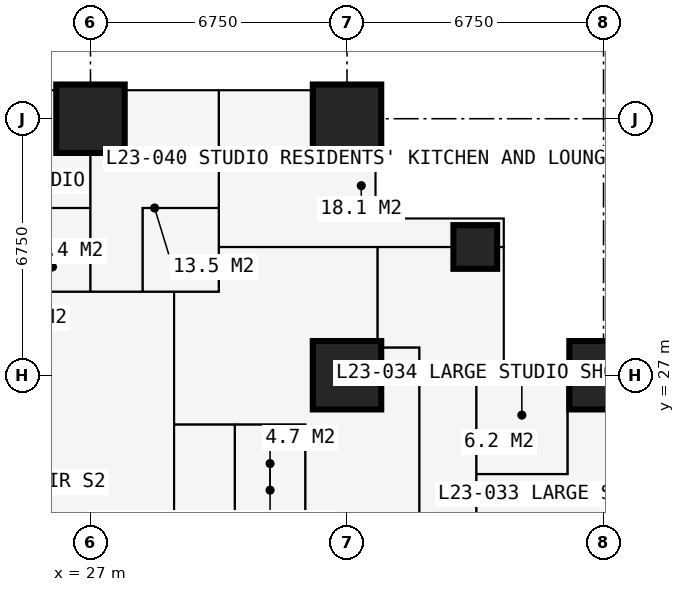
"""IFC4 building model, lengths in metres.
Left out: names, types, materials, properties, quantities, classifications, styles, units other than length and angle.
Written with IfcOpenShell. Run it as: python <this file> out.ifc"""

import sys

from ifc_helpers import new_model, si_unit, direction, frame, frame_2d, origin, origin_2d, place, context, subcontext, project, spatial, rectangle, extrude, element, fill, save


model = new_model("IFC4")
c1 = context("Model", 3, precision=1e-05, world=origin(), true_north=direction((0.0, 1.0)))
c2 = subcontext(c1, "Body", "Model", "MODEL_VIEW")
j1 = project(units=[si_unit("LENGTHUNIT", "METRE"), si_unit("PLANEANGLEUNIT", "RADIAN")], contexts=[c1])
p1 = place(None, origin())
s1 = spatial("IfcSite", under=j1, at=p1, CompositionType="ELEMENT")
p2 = place(p1, origin())
s2 = spatial("IfcBuilding", under=s1, at=p2, CompositionType="ELEMENT")
p3 = place(p2, frame((0.0, 0.0, 87.3)))
s3 = spatial("IfcBuildingStorey", under=s2, at=p3, CompositionType="ELEMENT", Elevation=87.3)
for number, where, z_axis, x_axis in (
    (1, (27.0, 33.75, 0.0), (0.0, 0.0, 1.0), (1.0, 0.0, 0.0)),
    (2, (33.75, 27.0, 0.0), (0.0, 0.0, 1.0), (1.0, 0.0, 0.0)),
    (3, (33.75, 33.75, 0.0), (0.0, 0.0, 1.0), (1.0, 0.0, 0.0)),
):
    element("IfcColumn", number, at=place(p3, frame(where, z_axis=z_axis, x_axis=x_axis)), inside=s3, PredefinedType="COLUMN", context=c2, shape_type="SweptSolid", body=[
        extrude(rectangle(XDim=1.8, YDim=1.8, at=origin_2d()), origin(), (0.0, 0.0, 1.0), 3.6),
    ])
p4 = place(p3, frame((37.125, 30.375, 0.0), z_axis=(0.0, 0.0, 1.0), x_axis=(1.0, 0.0, 0.0)))
e4 = element("IfcColumn", 4, at=p4, inside=s3, PredefinedType="COLUMN", context=c2, shape_type="SweptSolid", body=[
    extrude(rectangle(XDim=1.15, YDim=1.15, at=origin_2d()), origin(), (0.0, 0.0, 1.0), 3.6),
])
p5 = place(p3, frame((40.5, 27.0, 0.0), z_axis=(0.0, 0.0, 1.0), x_axis=(1.0, 0.0, 0.0)))
e5 = element("IfcColumn", 5, at=p5, inside=s3, PredefinedType="COLUMN", context=c2, shape_type="SweptSolid", body=[
    extrude(rectangle(XDim=1.8, YDim=1.8, at=origin_2d()), origin(), (0.0, 0.0, 1.0), 3.6),
])
p6 = place(p3, frame((27.0, 14.1, 0.0), z_axis=(0.0, 0.0, 1.0), x_axis=(0.0, 1.0, 0.0)))
e6 = element("IfcWall", 6, at=p6, inside=s3, PredefinedType="SHEAR", context=c2, shape_type="SweptSolid", body=[
    extrude(rectangle(XDim=12.3, YDim=1.2, at=frame_2d((6.15, 0.0))), origin(), (0.0, 0.0, 1.0), 3.6),
])
p7 = place(p6, frame((3.65, 0.0, 0.0)))
e7 = element("IfcOpeningElement", 7, at=p7, cuts=e6, PredefinedType="OPENING", context=c2, shape_type="SweptSolid", body=[
    extrude(rectangle(XDim=1.2, YDim=2.2, at=frame_2d((0.6, 1.1))), frame((0.0, 0.61, 0.0), z_axis=(0.0, -1.0, 0.0), x_axis=(1.0, 0.0, 0.0)), (0.0, 0.0, 1.0), 1.22),
])
p8 = place(p3, frame((27.6, 27.0, 0.0), z_axis=(0.0, 0.0, 1.0), x_axis=(-1.0, 0.0, 0.0)))
e8 = element("IfcWall", 8, at=p8, inside=s3, PredefinedType="SHEAR", context=c2, shape_type="SweptSolid", body=[
    extrude(rectangle(XDim=14.7, YDim=1.2, at=frame_2d((7.35, 0.0))), origin(), (0.0, 0.0, 1.0), 3.6),
])
p9 = place(p8, frame((5.225, 0.0, 0.0)))
e9 = element("IfcOpeningElement", 9, at=p9, cuts=e8, PredefinedType="OPENING", context=c2, shape_type="SweptSolid", body=[
    extrude(rectangle(XDim=0.9, YDim=2.2, at=frame_2d((0.45, 1.1))), frame((0.0, 0.61, 0.0), z_axis=(0.0, -1.0, 0.0), x_axis=(1.0, 0.0, 0.0)), (0.0, 0.0, 1.0), 1.22),
])
p10 = place(p8, frame((8.2, 0.0, 0.0)))
e10 = element("IfcOpeningElement", 10, at=p10, cuts=e8, PredefinedType="OPENING", context=c2, shape_type="SweptSolid", body=[
    extrude(rectangle(XDim=1.0, YDim=2.2, at=frame_2d((0.5, 1.1))), frame((0.0, 0.61, 0.0), z_axis=(0.0, -1.0, 0.0), x_axis=(1.0, 0.0, 0.0)), (0.0, 0.0, 1.0), 1.22),
])
p11 = place(p3, frame((41.25, 27.75, 0.0), z_axis=(0.0, 0.0, 1.0), x_axis=(-1.0, 0.0, 0.0)))
e11 = element("IfcWall", 11, at=p11, inside=s3, PredefinedType="SOLIDWALL", context=c2, shape_type="SweptSolid", body=[
    extrude(rectangle(XDim=3.375, YDim=0.3, at=frame_2d((1.688, 0.0))), origin(), (0.0, 0.0, 1.0), 3.375),
])
p12 = place(p11, frame((1.833, 0.0, 0.9)))
e12 = element("IfcOpeningElement", 12, at=p12, cuts=e11, PredefinedType="OPENING", context=c2, shape_type="SweptSolid", body=[
    extrude(rectangle(XDim=1.2, YDim=1.8, at=frame_2d((0.6, 0.9))), frame((0.0, 0.16, 0.0), z_axis=(0.0, -1.0, 0.0), x_axis=(1.0, 0.0, 0.0)), (0.0, 0.0, 1.0), 0.32),
])
p13 = place(p3, frame((37.875, 27.75, 0.0), z_axis=(0.0, 0.0, 1.0), x_axis=(0.0, 1.0, 0.0)))
e13 = element("IfcWall", 13, at=p13, inside=s3, PredefinedType="SOLIDWALL", context=c2, shape_type="SweptSolid", body=[
    extrude(rectangle(XDim=3.375, YDim=0.3, at=frame_2d((1.688, 0.0))), origin(), (0.0, 0.0, 1.0), 3.375),
])
p14 = place(p13, frame((0.788, 0.0, 0.6)))
e14 = element("IfcOpeningElement", 14, at=p14, cuts=e13, PredefinedType="OPENING", context=c2, shape_type="SweptSolid", body=[
    extrude(rectangle(XDim=1.8, YDim=2.1, at=frame_2d((0.9, 1.05))), frame((0.0, 0.16, 0.0), z_axis=(0.0, -1.0, 0.0), x_axis=(1.0, 0.0, 0.0)), (0.0, 0.0, 1.0), 0.32),
])
p15 = place(p3, frame((37.875, 31.125, 0.0), z_axis=(0.0, 0.0, 1.0), x_axis=(-1.0, 0.0, 0.0)))
e15 = element("IfcWall", 15, at=p15, inside=s3, PredefinedType="SOLIDWALL", context=c2, shape_type="SweptSolid", body=[
    extrude(rectangle(XDim=3.375, YDim=0.3, at=frame_2d((1.688, 0.0))), origin(), (0.0, 0.0, 1.0), 3.375),
])
p16 = place(p15, frame((0.788, 0.0, 0.6)))
e16 = element("IfcOpeningElement", 16, at=p16, cuts=e15, PredefinedType="OPENING", context=c2, shape_type="SweptSolid", body=[
    extrude(rectangle(XDim=1.8, YDim=2.1, at=frame_2d((0.9, 1.05))), frame((0.0, 0.16, 0.0), z_axis=(0.0, -1.0, 0.0), x_axis=(1.0, 0.0, 0.0)), (0.0, 0.0, 1.0), 0.32),
])
p17 = place(p3, frame((34.5, 31.125, 0.0), z_axis=(0.0, 0.0, 1.0), x_axis=(0.0, 1.0, 0.0)))
e17 = element("IfcWall", 17, at=p17, inside=s3, PredefinedType="SOLIDWALL", context=c2, shape_type="SweptSolid", body=[
    extrude(rectangle(XDim=3.375, YDim=0.3, at=frame_2d((1.688, 0.0))), origin(), (0.0, 0.0, 1.0), 3.375),
])
p18 = place(p17, frame((0.272, 0.0, 0.9)))
e18 = element("IfcOpeningElement", 18, at=p18, cuts=e17, PredefinedType="OPENING", context=c2, shape_type="SweptSolid", body=[
    extrude(rectangle(XDim=0.9, YDim=1.8, at=frame_2d((0.45, 0.9))), frame((0.0, 0.16, 0.0), z_axis=(0.0, -1.0, 0.0), x_axis=(1.0, 0.0, 0.0)), (0.0, 0.0, 1.0), 0.32),
])
p19 = place(p3, frame((11.3, 29.2, 0.0), z_axis=(0.0, 0.0, 1.0), x_axis=(1.0, 0.0, 0.0)))
e19 = element("IfcWall", 19, at=p19, inside=s3, PredefinedType="PARTITIONING", context=c2, shape_type="SweptSolid", body=[
    extrude(rectangle(XDim=19.075, YDim=0.15, at=frame_2d((9.538, 0.0))), origin(), (0.0, 0.0, 1.0), 3.375),
])
p20 = place(p19, frame((5.825, 0.0, 0.0)))
e20 = element("IfcOpeningElement", 20, at=p20, cuts=e19, PredefinedType="OPENING", context=c2, shape_type="SweptSolid", body=[
    extrude(rectangle(XDim=0.95, YDim=2.2, at=frame_2d((0.475, 1.1))), frame((0.0, 0.085, 0.0), z_axis=(0.0, -1.0, 0.0), x_axis=(1.0, 0.0, 0.0)), (0.0, 0.0, 1.0), 0.17),
])
p21 = place(p19, frame((9.2, 0.0, 0.0)))
e21 = element("IfcOpeningElement", 21, at=p21, cuts=e19, PredefinedType="OPENING", context=c2, shape_type="SweptSolid", body=[
    extrude(rectangle(XDim=0.95, YDim=2.2, at=frame_2d((0.475, 1.1))), frame((0.0, 0.085, 0.0), z_axis=(0.0, -1.0, 0.0), x_axis=(1.0, 0.0, 0.0)), (0.0, 0.0, 1.0), 0.17),
])
p22 = place(p19, frame((12.575, 0.0, 0.0)))
e22 = element("IfcOpeningElement", 22, at=p22, cuts=e19, PredefinedType="OPENING", context=c2, shape_type="SweptSolid", body=[
    extrude(rectangle(XDim=0.95, YDim=2.2, at=frame_2d((0.475, 1.1))), frame((0.0, 0.085, 0.0), z_axis=(0.0, -1.0, 0.0), x_axis=(1.0, 0.0, 0.0)), (0.0, 0.0, 1.0), 0.17),
])
p23 = place(p19, frame((15.95, 0.0, 0.0)))
e23 = element("IfcOpeningElement", 23, at=p23, cuts=e19, PredefinedType="OPENING", context=c2, shape_type="SweptSolid", body=[
    extrude(rectangle(XDim=0.95, YDim=2.2, at=frame_2d((0.475, 1.1))), frame((0.0, 0.085, 0.0), z_axis=(0.0, -1.0, 0.0), x_axis=(1.0, 0.0, 0.0)), (0.0, 0.0, 1.0), 0.17),
])
p24 = place(p19, frame((0.6, 0.0, 0.0)))
e24 = element("IfcOpeningElement", 24, at=p24, cuts=e19, PredefinedType="OPENING", context=c2, shape_type="SweptSolid", body=[
    extrude(rectangle(XDim=1.0, YDim=2.2, at=frame_2d((0.5, 1.1))), frame((0.0, 0.085, 0.0), z_axis=(0.0, -1.0, 0.0), x_axis=(1.0, 0.0, 0.0)), (0.0, 0.0, 1.0), 0.17),
])
p25 = place(p3, frame((25.0, 31.4, 0.0), z_axis=(0.0, 0.0, 1.0), x_axis=(1.0, 0.0, 0.0)))
e25 = element("IfcWall", 25, at=p25, inside=s3, PredefinedType="PARTITIONING", context=c2, shape_type="SweptSolid", body=[
    extrude(rectangle(XDim=2.0, YDim=0.1, at=frame_2d((1.0, 0.0))), origin(), (0.0, 0.0, 1.0), 3.375),
])
p26 = place(p3, frame((27.0, 29.2, 0.0), z_axis=(0.0, 0.0, 1.0), x_axis=(0.0, 1.0, 0.0)))
e26 = element("IfcWall", 26, at=p26, inside=s3, PredefinedType="PARTITIONING", context=c2, shape_type="SweptSolid", body=[
    extrude(rectangle(XDim=5.284, YDim=0.175, at=frame_2d((2.642, 0.0))), origin(), (0.0, 0.0, 1.0), 2.61),
])
p27 = place(p3, frame((28.375, 29.2, 0.0), z_axis=(0.0, 0.0, 1.0), x_axis=(0.0, 1.0, 0.0)))
e27 = element("IfcWall", 27, at=p27, inside=s3, PredefinedType="PARTITIONING", context=c2, shape_type="SweptSolid", body=[
    extrude(rectangle(XDim=2.2, YDim=0.1, at=frame_2d((1.1, 0.0))), origin(), (0.0, 0.0, 1.0), 3.375),
])
p28 = place(p27, frame((0.65, 0.0, 0.0)))
e28 = element("IfcOpeningElement", 28, at=p28, cuts=e27, PredefinedType="OPENING", context=c2, shape_type="SweptSolid", body=[
    extrude(rectangle(XDim=0.9, YDim=2.2, at=frame_2d((0.45, 1.1))), frame((0.0, 0.06, 0.0), z_axis=(0.0, -1.0, 0.0), x_axis=(1.0, 0.0, 0.0)), (0.0, 0.0, 1.0), 0.12),
])
p29 = place(p3, frame((28.375, 31.4, 0.0), z_axis=(0.0, 0.0, 1.0), x_axis=(1.0, 0.0, 0.0)))
e29 = element("IfcWall", 29, at=p29, inside=s3, PredefinedType="PARTITIONING", context=c2, shape_type="SweptSolid", body=[
    extrude(rectangle(XDim=2.0, YDim=0.1, at=frame_2d((1.0, 0.0))), origin(), (0.0, 0.0, 1.0), 3.375),
])
p30 = place(p3, frame((29.2, 11.3, 0.0), z_axis=(0.0, 0.0, 1.0), x_axis=(0.0, 1.0, 0.0)))
e30 = element("IfcWall", 30, at=p30, inside=s3, PredefinedType="PARTITIONING", context=c2, shape_type="SweptSolid", body=[
    extrude(rectangle(XDim=17.9, YDim=0.2, at=frame_2d((8.95, 0.0))), origin(), (0.0, 0.0, 1.0), 3.375),
])
p31 = place(p30, frame((8.35, 0.0, 0.0)))
e31 = element("IfcOpeningElement", 31, at=p31, cuts=e30, PredefinedType="OPENING", context=c2, shape_type="SweptSolid", body=[
    extrude(rectangle(XDim=1.2, YDim=2.2, at=frame_2d((0.6, 1.1))), frame((0.0, 0.11, 0.0), z_axis=(0.0, -1.0, 0.0), x_axis=(1.0, 0.0, 0.0)), (0.0, 0.0, 1.0), 0.22),
])
p32 = place(p3, frame((29.2, 25.7, 0.0), z_axis=(0.0, 0.0, 1.0), x_axis=(1.0, 0.0, 0.0)))
e32 = element("IfcWall", 32, at=p32, inside=s3, PredefinedType="SHEAR", context=c2, shape_type="SweptSolid", body=[
    extrude(rectangle(XDim=3.45, YDim=0.1, at=frame_2d((1.725, 0.0))), origin(), (0.0, 0.0, 1.0), 3.375),
])
p33 = place(p3, frame((30.375, 29.2, 0.0), z_axis=(0.0, 0.0, 1.0), x_axis=(0.0, 1.0, 0.0)))
e33 = element("IfcWall", 33, at=p33, inside=s3, PredefinedType="PARTITIONING", context=c2, shape_type="SweptSolid", body=[
    extrude(rectangle(XDim=5.284, YDim=0.15, at=frame_2d((2.642, 0.0))), origin(), (0.0, 0.0, 1.0), 3.375),
])
p34 = place(p3, frame((30.375, 30.375, 0.0), z_axis=(0.0, 0.0, 1.0), x_axis=(1.0, 0.0, 0.0)))
e34 = element("IfcWall", 34, at=p34, inside=s3, PredefinedType="PARTITIONING", context=c2, shape_type="SweptSolid", body=[
    extrude(rectangle(XDim=7.35, YDim=0.15, at=frame_2d((3.675, 0.0))), origin(), (0.0, 0.0, 1.0), 2.877),
])
p35 = place(p34, frame((5.125, 0.0, 0.0)))
e35 = element("IfcOpeningElement", 35, at=p35, cuts=e34, PredefinedType="OPENING", context=c2, shape_type="SweptSolid", body=[
    extrude(rectangle(XDim=1.0, YDim=2.2, at=frame_2d((0.5, 1.1))), frame((0.0, 0.085, 0.0), z_axis=(0.0, -1.0, 0.0), x_axis=(1.0, 0.0, 0.0)), (0.0, 0.0, 1.0), 0.17),
])
p36 = place(p3, frame((30.8, 14.8, 0.0), z_axis=(0.0, 0.0, 1.0), x_axis=(0.0, 1.0, 0.0)))
e36 = element("IfcWall", 36, at=p36, inside=s3, PredefinedType="PARTITIONING", context=c2, shape_type="SweptSolid", body=[
    extrude(rectangle(XDim=10.9, YDim=0.15, at=frame_2d((5.45, 0.0))), origin(), (0.0, 0.0, 1.0), 3.375),
])
p37 = place(p36, frame((0.75, 0.0, 0.0)))
e37 = element("IfcOpeningElement", 37, at=p37, cuts=e36, PredefinedType="OPENING", context=c2, shape_type="SweptSolid", body=[
    extrude(rectangle(XDim=1.1, YDim=2.2, at=frame_2d((0.55, 1.1))), frame((0.0, 0.085, 0.0), z_axis=(0.0, -1.0, 0.0), x_axis=(1.0, 0.0, 0.0)), (0.0, 0.0, 1.0), 0.17),
])
p38 = place(p36, frame((3.25, 0.0, 0.0)))
e38 = element("IfcOpeningElement", 38, at=p38, cuts=e36, PredefinedType="OPENING", context=c2, shape_type="SweptSolid", body=[
    extrude(rectangle(XDim=1.1, YDim=2.2, at=frame_2d((0.55, 1.1))), frame((0.0, 0.085, 0.0), z_axis=(0.0, -1.0, 0.0), x_axis=(1.0, 0.0, 0.0)), (0.0, 0.0, 1.0), 0.17),
])
p39 = place(p36, frame((6.5, 0.0, 0.0)))
e39 = element("IfcOpeningElement", 39, at=p39, cuts=e36, PredefinedType="OPENING", context=c2, shape_type="SweptSolid", body=[
    extrude(rectangle(XDim=1.1, YDim=2.2, at=frame_2d((0.55, 1.1))), frame((0.0, 0.085, 0.0), z_axis=(0.0, -1.0, 0.0), x_axis=(1.0, 0.0, 0.0)), (0.0, 0.0, 1.0), 0.17),
])
p40 = place(p36, frame((9.05, 0.0, 0.0)))
e40 = element("IfcOpeningElement", 40, at=p40, cuts=e36, PredefinedType="OPENING", context=c2, shape_type="SweptSolid", body=[
    extrude(rectangle(XDim=1.1, YDim=2.2, at=frame_2d((0.55, 1.1))), frame((0.0, 0.085, 0.0), z_axis=(0.0, -1.0, 0.0), x_axis=(1.0, 0.0, 0.0)), (0.0, 0.0, 1.0), 0.17),
])
p41 = place(p3, frame((32.65, 20.6, 0.0), z_axis=(0.0, 0.0, 1.0), x_axis=(0.0, 1.0, 0.0)))
e41 = element("IfcWall", 41, at=p41, inside=s3, PredefinedType="PARTITIONING", context=c2, shape_type="SweptSolid", body=[
    extrude(rectangle(XDim=5.1, YDim=0.15, at=frame_2d((2.55, 0.0))), origin(), (0.0, 0.0, 1.0), 3.375),
])
p42 = place(p3, frame((33.75, 32.57, 0.0), z_axis=(0.0, 0.0, 1.0), x_axis=(0.0, 1.0, 0.0)))
e42 = element("IfcWall", 42, at=p42, inside=s3, PredefinedType="PARTITIONING", context=c2, shape_type="SweptSolid", body=[
    extrude(rectangle(XDim=1.914, YDim=0.15, at=frame_2d((0.957, 0.0))), origin(), (0.0, 0.0, 1.0), 2.877),
])
p43 = place(p3, frame((33.75, 32.57, 0.0), z_axis=(0.0, 0.0, 1.0), x_axis=(1.0, 0.0, 0.0)))
e43 = element("IfcWall", 43, at=p43, inside=s3, PredefinedType="PARTITIONING", context=c2, shape_type="SweptSolid", body=[
    extrude(rectangle(XDim=0.734, YDim=0.15, at=frame_2d((0.367, 0.0))), origin(), (0.0, 0.0, 1.0), 3.375),
])
p44 = place(p3, frame((34.55, 27.725, 0.0), z_axis=(0.0, 0.0, 1.0), x_axis=(0.0, 1.0, 0.0)))
e44 = element("IfcWall", 44, at=p44, inside=s3, PredefinedType="PARTITIONING", context=c2, shape_type="SweptSolid", body=[
    extrude(rectangle(XDim=2.65, YDim=0.15, at=frame_2d((1.325, 0.0))), origin(), (0.0, 0.0, 1.0), 3.375),
])
p45 = place(p3, frame((34.55, 27.725, 0.0), z_axis=(0.0, 0.0, 1.0), x_axis=(1.0, 0.0, 0.0)))
e45 = element("IfcWall", 45, at=p45, inside=s3, PredefinedType="PARTITIONING", context=c2, shape_type="SweptSolid", body=[
    extrude(rectangle(XDim=1.1, YDim=0.15, at=frame_2d((0.55, 0.0))), origin(), (0.0, 0.0, 1.0), 3.375),
])
p46 = place(p3, frame((35.65, 12.55, 0.0), z_axis=(0.0, 0.0, 1.0), x_axis=(0.0, 1.0, 0.0)))
e46 = element("IfcWall", 46, at=p46, inside=s3, PredefinedType="PARTITIONING", context=c2, shape_type="SweptSolid", body=[
    extrude(rectangle(XDim=15.175, YDim=0.15, at=frame_2d((7.587, 0.0))), origin(), (0.0, 0.0, 1.0), 3.375),
])
p47 = place(p46, frame((5.8, 0.0, 0.0)))
e47 = element("IfcOpeningElement", 47, at=p47, cuts=e46, PredefinedType="OPENING", context=c2, shape_type="SweptSolid", body=[
    extrude(rectangle(XDim=0.95, YDim=2.2, at=frame_2d((0.475, 1.1))), frame((0.0, 0.085, 0.0), z_axis=(0.0, -1.0, 0.0), x_axis=(1.0, 0.0, 0.0)), (0.0, 0.0, 1.0), 0.17),
])
p48 = place(p3, frame((37.15, 6.75, 0.0), z_axis=(0.0, 0.0, 1.0), x_axis=(0.0, 1.0, 0.0)))
e48 = element("IfcWall", 48, at=p48, inside=s3, PredefinedType="PARTITIONING", context=c2, shape_type="SweptSolid", body=[
    extrude(rectangle(XDim=20.25, YDim=0.15, at=frame_2d((10.125, 0.0))), origin(), (0.0, 0.0, 1.0), 3.375),
])
p49 = place(p48, frame((15.1, 0.0, 0.0)))
e49 = element("IfcOpeningElement", 49, at=p49, cuts=e48, PredefinedType="OPENING", context=c2, shape_type="SweptSolid", body=[
    extrude(rectangle(XDim=0.95, YDim=2.2, at=frame_2d((0.475, 1.1))), frame((0.0, 0.085, 0.0), z_axis=(0.0, -1.0, 0.0), x_axis=(1.0, 0.0, 0.0)), (0.0, 0.0, 1.0), 0.17),
])
p50 = place(p48, frame((8.35, 0.0, 0.0)))
e50 = element("IfcOpeningElement", 50, at=p50, cuts=e48, PredefinedType="OPENING", context=c2, shape_type="SweptSolid", body=[
    extrude(rectangle(XDim=0.95, YDim=2.2, at=frame_2d((0.475, 1.1))), frame((0.0, 0.085, 0.0), z_axis=(0.0, -1.0, 0.0), x_axis=(1.0, 0.0, 0.0)), (0.0, 0.0, 1.0), 0.17),
])
p51 = place(p3, frame((37.15, 24.4, 0.0), z_axis=(0.0, 0.0, 1.0), x_axis=(1.0, 0.0, 0.0)))
e51 = element("IfcWall", 51, at=p51, inside=s3, PredefinedType="PARTITIONING", context=c2, shape_type="SweptSolid", body=[
    extrude(rectangle(XDim=2.4, YDim=0.1, at=frame_2d((1.2, 0.0))), origin(), (0.0, 0.0, 1.0), 3.375),
])
p52 = place(p3, frame((37.15, 27.0, 0.0), z_axis=(0.0, 0.0, 1.0), x_axis=(1.0, 0.0, 0.0)))
e52 = element("IfcWall", 52, at=p52, inside=s3, PredefinedType="PARTITIONING", context=c2, shape_type="SweptSolid", body=[
    extrude(rectangle(XDim=4.084, YDim=0.1, at=frame_2d((2.042, 0.0))), origin(), (0.0, 0.0, 1.0), 2.877),
])
p53 = place(p3, frame((37.875, 27.0, 0.0), z_axis=(0.0, 0.0, 1.0), x_axis=(0.0, 1.0, 0.0)))
e53 = element("IfcWall", 53, at=p53, inside=s3, PredefinedType="PARTITIONING", context=c2, shape_type="SweptSolid", body=[
    extrude(rectangle(XDim=0.734, YDim=0.15, at=frame_2d((0.367, 0.0))), origin(), (0.0, 0.0, 1.0), 3.375),
])
p54 = place(p3, frame((39.55, 24.4, 0.0), z_axis=(0.0, 0.0, 1.0), x_axis=(0.0, 1.0, 0.0)))
e54 = element("IfcWall", 54, at=p54, inside=s3, PredefinedType="PARTITIONING", context=c2, shape_type="SweptSolid", body=[
    extrude(rectangle(XDim=2.6, YDim=0.1, at=frame_2d((1.3, 0.0))), origin(), (0.0, 0.0, 1.0), 3.375),
])
p55 = place(p54, frame((0.8, 0.0, 0.0)))
e55 = element("IfcOpeningElement", 55, at=p55, cuts=e54, PredefinedType="OPENING", context=c2, shape_type="SweptSolid", body=[
    extrude(rectangle(XDim=0.9, YDim=2.2, at=frame_2d((0.45, 1.1))), frame((0.0, 0.06, 0.0), z_axis=(0.0, -1.0, 0.0), x_axis=(1.0, 0.0, 0.0)), (0.0, 0.0, 1.0), 0.12),
])
p56 = place(p12, origin())
e56 = element("IfcWindow", 56, at=p56, inside=s3, PartitioningType="SINGLE_PANEL", PredefinedType="WINDOW", context=c2, shape_type="SweptSolid", body=[
    extrude(rectangle(XDim=1.2, YDim=1.8, at=frame_2d((0.6, 0.9))), frame((0.0, 0.03, 0.0), z_axis=(0.0, -1.0, 0.0), x_axis=(1.0, 0.0, 0.0)), (0.0, 0.0, 1.0), 0.06),
])
fill(e12, e56)
p57 = place(p14, origin())
e57 = element("IfcWindow", 57, at=p57, inside=s3, PartitioningType="SINGLE_PANEL", PredefinedType="WINDOW", context=c2, shape_type="SweptSolid", body=[
    extrude(rectangle(XDim=1.8, YDim=2.1, at=frame_2d((0.9, 1.05))), frame((0.0, 0.03, 0.0), z_axis=(0.0, -1.0, 0.0), x_axis=(1.0, 0.0, 0.0)), (0.0, 0.0, 1.0), 0.06),
])
fill(e14, e57)
p58 = place(p16, origin())
e58 = element("IfcWindow", 58, at=p58, inside=s3, PartitioningType="SINGLE_PANEL", PredefinedType="WINDOW", context=c2, shape_type="SweptSolid", body=[
    extrude(rectangle(XDim=1.8, YDim=2.1, at=frame_2d((0.9, 1.05))), frame((0.0, 0.03, 0.0), z_axis=(0.0, -1.0, 0.0), x_axis=(1.0, 0.0, 0.0)), (0.0, 0.0, 1.0), 0.06),
])
fill(e16, e58)
p59 = place(p18, origin())
e59 = element("IfcWindow", 59, at=p59, inside=s3, PartitioningType="SINGLE_PANEL", PredefinedType="WINDOW", context=c2, shape_type="SweptSolid", body=[
    extrude(rectangle(XDim=0.9, YDim=1.8, at=frame_2d((0.45, 0.9))), frame((0.0, 0.03, 0.0), z_axis=(0.0, -1.0, 0.0), x_axis=(1.0, 0.0, 0.0)), (0.0, 0.0, 1.0), 0.06),
])
fill(e18, e59)
p60 = place(p55, origin())
e60 = element("IfcDoor", 60, at=p60, inside=s3, OperationType="SINGLE_SWING_RIGHT", PredefinedType="DOOR", context=c2, shape_type="SweptSolid", body=[
    extrude(rectangle(XDim=0.9, YDim=2.2, at=frame_2d((0.45, 1.1))), frame((0.0, 0.025, 0.0), z_axis=(0.0, -1.0, 0.0), x_axis=(1.0, 0.0, 0.0)), (0.0, 0.0, 1.0), 0.05),
])
fill(e55, e60)
p61 = place(p35, origin())
e61 = element("IfcDoor", 61, at=p61, inside=s3, OperationType="SINGLE_SWING_LEFT", PredefinedType="DOOR", context=c2, shape_type="SweptSolid", body=[
    extrude(rectangle(XDim=1.0, YDim=2.2, at=frame_2d((0.5, 1.1))), frame((0.0, 0.025, 0.0), z_axis=(0.0, -1.0, 0.0), x_axis=(1.0, 0.0, 0.0)), (0.0, 0.0, 1.0), 0.05),
])
fill(e35, e61)
p62 = place(p23, origin())
e62 = element("IfcDoor", 62, at=p62, inside=s3, OperationType="SINGLE_SWING_LEFT", PredefinedType="DOOR", context=c2, shape_type="SweptSolid", body=[
    extrude(rectangle(XDim=0.95, YDim=2.2, at=frame_2d((0.475, 1.1))), frame((0.0, 0.025, 0.0), z_axis=(0.0, -1.0, 0.0), x_axis=(1.0, 0.0, 0.0)), (0.0, 0.0, 1.0), 0.05),
])
fill(e23, e62)
p63 = place(p28, origin())
e63 = element("IfcDoor", 63, at=p63, inside=s3, OperationType="SINGLE_SWING_RIGHT", PredefinedType="DOOR", context=c2, shape_type="SweptSolid", body=[
    extrude(rectangle(XDim=0.9, YDim=2.2, at=frame_2d((0.45, 1.1))), frame((0.0, 0.025, 0.0), z_axis=(0.0, -1.0, 0.0), x_axis=(1.0, 0.0, 0.0)), (0.0, 0.0, 1.0), 0.05),
])
fill(e28, e63)
p64 = place(p40, origin())
e64 = element("IfcDoor", 64, at=p64, inside=s3, OperationType="DOUBLE_DOOR_SLIDING", PredefinedType="DOOR", context=c2, shape_type="SweptSolid", body=[
    extrude(rectangle(XDim=1.1, YDim=2.2, at=frame_2d((0.55, 1.1))), frame((0.0, 0.025, 0.0), z_axis=(0.0, -1.0, 0.0), x_axis=(1.0, 0.0, 0.0)), (0.0, 0.0, 1.0), 0.05),
])
fill(e40, e64)
save(model, sys.argv[1])
